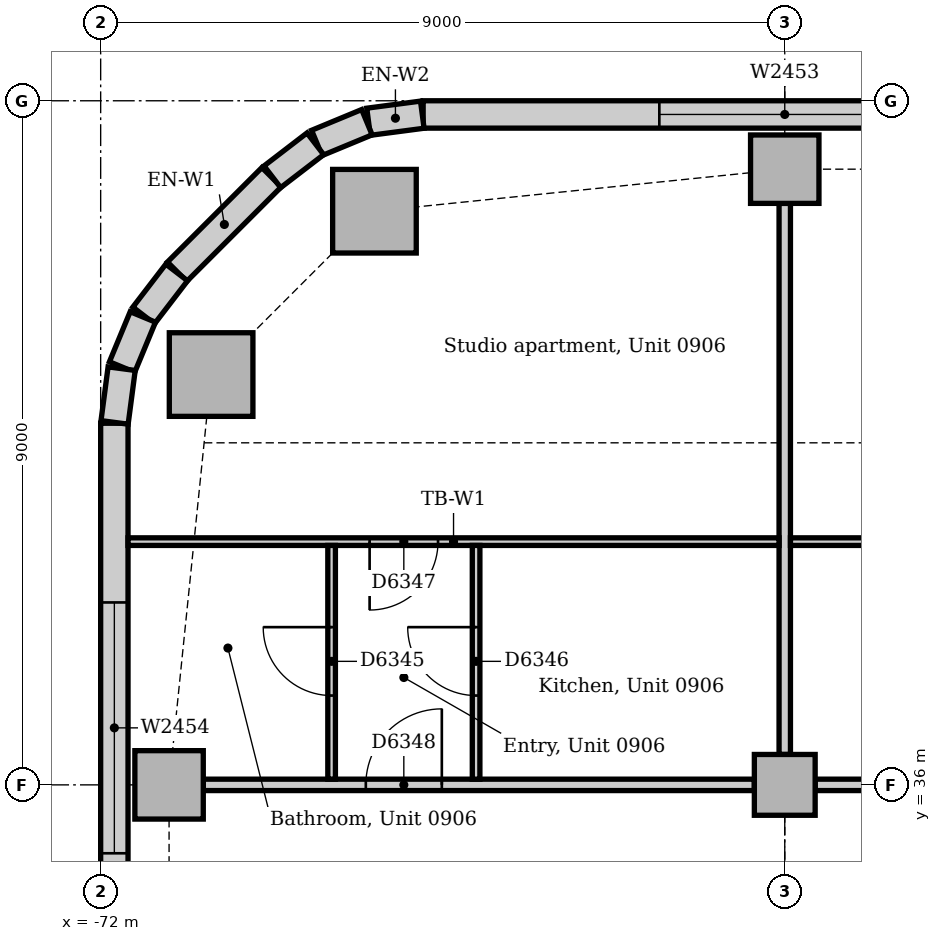
"""IFC4 building model, lengths in metres.
Left out: names, types, materials, properties, quantities, classifications, styles, units other than length and angle.
Written with IfcOpenShell. Run it as: python <this file> out.ifc"""

import sys

from ifc_helpers import new_model, si_unit, direction, frame, frame_2d, origin, origin_2d, place, context, subcontext, project, spatial, rectangle, extrude, element, fill, save


model = new_model("IFC4")
c1 = context("Model", 3, precision=1e-05, world=origin(), true_north=direction((0.0, 1.0)))
c2 = subcontext(c1, "Body", "Model", "MODEL_VIEW")
j1 = project(units=[si_unit("LENGTHUNIT", "METRE"), si_unit("PLANEANGLEUNIT", "RADIAN")], contexts=[c1])
p1 = place(None, origin())
s1 = spatial("IfcSite", under=j1, at=p1, CompositionType="ELEMENT")
p2 = place(p1, origin())
s2 = spatial("IfcBuilding", under=s1, at=p2, CompositionType="ELEMENT")
p3 = place(p2, frame((0.0, 0.0, 42.0)))
s3 = spatial("IfcBuildingStorey", under=s2, at=p3, CompositionType="ELEMENT", Elevation=42.0)
for number, where, z_axis, x_axis in (
    (1, (-68.398, 43.547, 0.0), (0.0, 0.0, 1.0), (1.0, 0.0, 0.0)),
    (2, (-70.547, 41.398, 0.0), (0.0, 0.0, 1.0), (1.0, 0.0, 0.0)),
):
    element("IfcColumn", number, at=place(p3, frame(where, z_axis=z_axis, x_axis=x_axis)), inside=s3, PredefinedType="COLUMN", context=c2, shape_type="SweptSolid", body=[
        extrude(rectangle(XDim=1.1, YDim=1.1, at=origin_2d()), origin(), (0.0, 0.0, 1.0), 3.7),
    ])
for number, where, z_axis, x_axis in (
    (3, (-63.0, 44.1, 0.0), (0.0, 0.0, 1.0), (1.0, 0.0, 0.0)),
    (4, (-71.1, 36.0, 0.0), (0.0, 0.0, 1.0), (1.0, 0.0, 0.0)),
):
    element("IfcColumn", number, at=place(p3, frame(where, z_axis=z_axis, x_axis=x_axis)), inside=s3, PredefinedType="COLUMN", context=c2, shape_type="SweptSolid", body=[
        extrude(rectangle(XDim=0.9, YDim=0.9, at=origin_2d()), origin(), (0.0, 0.0, 1.0), 3.7),
    ])
p4 = place(p3, frame((-63.0, 36.0, 0.0), z_axis=(0.0, 0.0, 1.0), x_axis=(1.0, 0.0, 0.0)))
e5 = element("IfcColumn", 5, at=p4, inside=s3, PredefinedType="COLUMN", context=c2, shape_type="SweptSolid", body=[
    extrude(rectangle(XDim=0.8, YDim=0.8, at=origin_2d()), origin(), (0.0, 0.0, 1.0), 3.7),
])
p5 = place(p3, frame((-31.243, 44.82, 0.0), z_axis=(0.0, 0.0, 1.0), x_axis=(-1.0, 0.0, 0.0)))
e6 = element("IfcWall", 6, at=p5, inside=s3, PredefinedType="STANDARD", context=c2, shape_type="SweptSolid", body=[
    extrude(rectangle(XDim=36.515, YDim=0.36, at=frame_2d((18.257, 0.0))), origin(), (0.0, 0.0, 1.0), 3.7),
])
p6 = place(p5, frame((3.107, 0.0, 0.9)))
e7 = element("IfcOpeningElement", 7, at=p6, cuts=e6, PredefinedType="OPENING", context=c2, shape_type="SweptSolid", body=[
    extrude(rectangle(XDim=3.3, YDim=1.6, at=frame_2d((1.65, 0.8))), frame((0.0, 0.19, 0.0), z_axis=(0.0, -1.0, 0.0), x_axis=(1.0, 0.0, 0.0)), (0.0, 0.0, 1.0), 0.38),
])
p7 = place(p5, frame((7.607, 0.0, 0.9)))
e8 = element("IfcOpeningElement", 8, at=p7, cuts=e6, PredefinedType="OPENING", context=c2, shape_type="SweptSolid", body=[
    extrude(rectangle(XDim=3.3, YDim=1.6, at=frame_2d((1.65, 0.8))), frame((0.0, 0.19, 0.0), z_axis=(0.0, -1.0, 0.0), x_axis=(1.0, 0.0, 0.0)), (0.0, 0.0, 1.0), 0.38),
])
p8 = place(p5, frame((12.107, 0.0, 0.9)))
e9 = element("IfcOpeningElement", 9, at=p8, cuts=e6, PredefinedType="OPENING", context=c2, shape_type="SweptSolid", body=[
    extrude(rectangle(XDim=3.3, YDim=1.6, at=frame_2d((1.65, 0.8))), frame((0.0, 0.19, 0.0), z_axis=(0.0, -1.0, 0.0), x_axis=(1.0, 0.0, 0.0)), (0.0, 0.0, 1.0), 0.38),
])
p9 = place(p5, frame((16.607, 0.0, 0.9)))
e10 = element("IfcOpeningElement", 10, at=p9, cuts=e6, PredefinedType="OPENING", context=c2, shape_type="SweptSolid", body=[
    extrude(rectangle(XDim=3.3, YDim=1.6, at=frame_2d((1.65, 0.8))), frame((0.0, 0.19, 0.0), z_axis=(0.0, -1.0, 0.0), x_axis=(1.0, 0.0, 0.0)), (0.0, 0.0, 1.0), 0.38),
])
p10 = place(p5, frame((21.107, 0.0, 0.9)))
e11 = element("IfcOpeningElement", 11, at=p10, cuts=e6, PredefinedType="OPENING", context=c2, shape_type="SweptSolid", body=[
    extrude(rectangle(XDim=3.3, YDim=1.6, at=frame_2d((1.65, 0.8))), frame((0.0, 0.19, 0.0), z_axis=(0.0, -1.0, 0.0), x_axis=(1.0, 0.0, 0.0)), (0.0, 0.0, 1.0), 0.38),
])
p11 = place(p5, frame((25.607, 0.0, 0.9)))
e12 = element("IfcOpeningElement", 12, at=p11, cuts=e6, PredefinedType="OPENING", context=c2, shape_type="SweptSolid", body=[
    extrude(rectangle(XDim=3.3, YDim=1.6, at=frame_2d((1.65, 0.8))), frame((0.0, 0.19, 0.0), z_axis=(0.0, -1.0, 0.0), x_axis=(1.0, 0.0, 0.0)), (0.0, 0.0, 1.0), 0.38),
])
p12 = place(p5, frame((30.107, 0.0, 0.9)))
e13 = element("IfcOpeningElement", 13, at=p12, cuts=e6, PredefinedType="OPENING", context=c2, shape_type="SweptSolid", body=[
    extrude(rectangle(XDim=3.3, YDim=1.6, at=frame_2d((1.65, 0.8))), frame((0.0, 0.19, 0.0), z_axis=(0.0, -1.0, 0.0), x_axis=(1.0, 0.0, 0.0)), (0.0, 0.0, 1.0), 0.38),
])
p13 = place(p3, frame((-69.751, 43.994, 0.0), z_axis=(0.0, 0.0, 1.0), x_axis=(-0.707106781187, -0.707106781187, 0.0)))
e14 = element("IfcWall", 14, at=p13, inside=s3, PredefinedType="STANDARD", context=c2, shape_type="SweptSolid", body=[
    extrude(rectangle(XDim=1.757, YDim=0.36, at=frame_2d((0.879, 0.0))), origin(), (0.0, 0.0, 1.0), 3.7),
])
p14 = place(p3, frame((-71.82, 40.757, 0.0), z_axis=(0.0, 0.0, 1.0), x_axis=(0.0, -1.0, 0.0)))
e15 = element("IfcWall", 15, at=p14, inside=s3, PredefinedType="STANDARD", context=c2, shape_type="SweptSolid", body=[
    extrude(rectangle(XDim=26.015, YDim=0.36, at=frame_2d((13.007, 0.0))), origin(), (0.0, 0.0, 1.0), 3.7),
])
p15 = place(p14, frame((2.357, 0.0, 0.9)))
e16 = element("IfcOpeningElement", 16, at=p15, cuts=e15, PredefinedType="OPENING", context=c2, shape_type="SweptSolid", body=[
    extrude(rectangle(XDim=3.3, YDim=1.6, at=frame_2d((1.65, 0.8))), frame((0.0, 0.19, 0.0), z_axis=(0.0, -1.0, 0.0), x_axis=(1.0, 0.0, 0.0)), (0.0, 0.0, 1.0), 0.38),
])
p16 = place(p14, frame((7.057, 0.0, 0.9)))
e17 = element("IfcOpeningElement", 17, at=p16, cuts=e15, PredefinedType="OPENING", context=c2, shape_type="SweptSolid", body=[
    extrude(rectangle(XDim=3.3, YDim=1.6, at=frame_2d((1.65, 0.8))), frame((0.0, 0.19, 0.0), z_axis=(0.0, -1.0, 0.0), x_axis=(1.0, 0.0, 0.0)), (0.0, 0.0, 1.0), 0.38),
])
p17 = place(p14, frame((11.357, 0.0, 0.9)))
e18 = element("IfcOpeningElement", 18, at=p17, cuts=e15, PredefinedType="OPENING", context=c2, shape_type="SweptSolid", body=[
    extrude(rectangle(XDim=3.3, YDim=1.6, at=frame_2d((1.65, 0.8))), frame((0.0, 0.19, 0.0), z_axis=(0.0, -1.0, 0.0), x_axis=(1.0, 0.0, 0.0)), (0.0, 0.0, 1.0), 0.38),
])
p18 = place(p14, frame((15.857, 0.0, 0.9)))
e19 = element("IfcOpeningElement", 19, at=p18, cuts=e15, PredefinedType="OPENING", context=c2, shape_type="SweptSolid", body=[
    extrude(rectangle(XDim=3.3, YDim=1.6, at=frame_2d((1.65, 0.8))), frame((0.0, 0.19, 0.0), z_axis=(0.0, -1.0, 0.0), x_axis=(1.0, 0.0, 0.0)), (0.0, 0.0, 1.0), 0.38),
])
p19 = place(p14, frame((20.957, 0.0, 0.9)))
e20 = element("IfcOpeningElement", 20, at=p19, cuts=e15, PredefinedType="OPENING", context=c2, shape_type="SweptSolid", body=[
    extrude(rectangle(XDim=3.3, YDim=1.6, at=frame_2d((1.65, 0.8))), frame((0.0, 0.19, 0.0), z_axis=(0.0, -1.0, 0.0), x_axis=(1.0, 0.0, 0.0)), (0.0, 0.0, 1.0), 0.38),
])
for number, where, z_axis, x_axis in (
    (21, (-67.769, 44.817, 0.0), (0.0, 0.0, 1.0), (-0.991, -0.131, 0.0)),
    (22, (-68.497, 44.718, 0.0), (0.0, 0.0, 1.0), (-0.924, -0.383, 0.0)),
):
    element("IfcWall", number, at=place(p3, frame(where, z_axis=z_axis, x_axis=x_axis)), inside=s3, PredefinedType="STANDARD", context=c2, shape_type="SweptSolid", body=[
        extrude(rectangle(XDim=0.713, YDim=0.36, at=frame_2d((0.356, 0.0))), origin(), (0.0, 0.0, 1.0), 3.7),
    ])
for number, where, z_axis, x_axis in (
    (23, (-69.175, 44.434, 0.0), (0.0, 0.0, 1.0), (-0.793, -0.609, 0.0)),
    (24, (-71.0, 42.741, 0.0), (0.0, 0.0, 1.0), (-0.609, -0.793, 0.0)),
):
    element("IfcWall", number, at=place(p3, frame(where, z_axis=z_axis, x_axis=x_axis)), inside=s3, PredefinedType="STANDARD", context=c2, shape_type="SweptSolid", body=[
        extrude(rectangle(XDim=0.713, YDim=0.36, at=frame_2d((0.357, 0.0))), origin(), (0.0, 0.0, 1.0), 3.7),
    ])
for number, where, z_axis, x_axis in (
    (25, (-71.445, 42.156, 0.0), (0.0, 0.0, 1.0), (-0.383, -0.924, 0.0)),
    (26, (-71.724, 41.476, 0.0), (0.0, 0.0, 1.0), (-0.131, -0.991, 0.0)),
):
    element("IfcWall", number, at=place(p3, frame(where, z_axis=z_axis, x_axis=x_axis)), inside=s3, PredefinedType="STANDARD", context=c2, shape_type="SweptSolid", body=[
        extrude(rectangle(XDim=0.713, YDim=0.36, at=frame_2d((0.356, 0.0))), origin(), (0.0, 0.0, 1.0), 3.7),
    ])
p20 = place(p3, frame((-62.6, 36.0, 0.0), z_axis=(0.0, 0.0, 1.0), x_axis=(1.0, 0.0, 0.0)))
e27 = element("IfcWall", 27, at=p20, inside=s3, PredefinedType="PARTITIONING", context=c2, shape_type="SweptSolid", body=[
    extrude(rectangle(XDim=8.2, YDim=0.15, at=frame_2d((4.1, 0.0))), origin(), (0.0, 0.0, 1.0), 3.0),
])
p21 = place(p20, frame((2.89, 0.0, 0.0)))
e28 = element("IfcOpeningElement", 28, at=p21, cuts=e27, PredefinedType="OPENING", context=c2, shape_type="SweptSolid", body=[
    extrude(rectangle(XDim=1.0, YDim=2.1, at=frame_2d((0.5, 1.05))), frame((0.0, 0.085, 0.0), z_axis=(0.0, -1.0, 0.0), x_axis=(1.0, 0.0, 0.0)), (0.0, 0.0, 1.0), 0.17),
])
p22 = place(p3, frame((-70.65, 36.0, 0.0), z_axis=(0.0, 0.0, 1.0), x_axis=(1.0, 0.0, 0.0)))
e29 = element("IfcWall", 29, at=p22, inside=s3, PredefinedType="PARTITIONING", context=c2, shape_type="SweptSolid", body=[
    extrude(rectangle(XDim=7.25, YDim=0.15, at=frame_2d((3.625, 0.0))), origin(), (0.0, 0.0, 1.0), 3.0),
])
p23 = place(p22, frame((2.138, 0.0, 0.0)))
e30 = element("IfcOpeningElement", 30, at=p23, cuts=e29, PredefinedType="OPENING", context=c2, shape_type="SweptSolid", body=[
    extrude(rectangle(XDim=1.0, YDim=2.1, at=frame_2d((0.5, 1.05))), frame((0.0, 0.085, 0.0), z_axis=(0.0, -1.0, 0.0), x_axis=(1.0, 0.0, 0.0)), (0.0, 0.0, 1.0), 0.17),
])
p24 = place(p3, frame((-63.0, 36.4, 0.0), z_axis=(0.0, 0.0, 1.0), x_axis=(0.0, 1.0, 0.0)))
e31 = element("IfcWall", 31, at=p24, inside=s3, PredefinedType="PARTITIONING", context=c2, shape_type="SweptSolid", body=[
    extrude(rectangle(XDim=7.25, YDim=0.15, at=frame_2d((3.625, 0.0))), origin(), (0.0, 0.0, 1.0), 3.008),
])
p25 = place(p3, frame((-62.925, 39.2, 0.0), z_axis=(0.0, 0.0, 1.0), x_axis=(1.0, 0.0, 0.0)))
e32 = element("IfcWall", 32, at=p25, inside=s3, PredefinedType="PARTITIONING", context=c2, shape_type="SweptSolid", body=[
    extrude(rectangle(XDim=8.85, YDim=0.1, at=frame_2d((4.425, 0.0))), origin(), (0.0, 0.0, 1.0), 3.7),
])
p26 = place(p25, frame((3.265, 0.0, 0.0)))
e33 = element("IfcOpeningElement", 33, at=p26, cuts=e32, PredefinedType="OPENING", context=c2, shape_type="SweptSolid", body=[
    extrude(rectangle(XDim=0.9, YDim=2.1, at=frame_2d((0.45, 1.05))), frame((0.0, 0.06, 0.0), z_axis=(0.0, -1.0, 0.0), x_axis=(1.0, 0.0, 0.0)), (0.0, 0.0, 1.0), 0.12),
])
p27 = place(p3, frame((-71.64, 39.2, 0.0), z_axis=(0.0, 0.0, 1.0), x_axis=(1.0, 0.0, 0.0)))
e34 = element("IfcWall", 34, at=p27, inside=s3, PredefinedType="PARTITIONING", context=c2, shape_type="SweptSolid", body=[
    extrude(rectangle(XDim=8.565, YDim=0.1, at=frame_2d((4.282, 0.0))), origin(), (0.0, 0.0, 1.0), 3.7),
])
p28 = place(p27, frame((3.178, 0.0, 0.0)))
e35 = element("IfcOpeningElement", 35, at=p28, cuts=e34, PredefinedType="OPENING", context=c2, shape_type="SweptSolid", body=[
    extrude(rectangle(XDim=0.9, YDim=2.1, at=frame_2d((0.45, 1.05))), frame((0.0, 0.06, 0.0), z_axis=(0.0, -1.0, 0.0), x_axis=(1.0, 0.0, 0.0)), (0.0, 0.0, 1.0), 0.12),
])
p29 = place(p3, frame((-68.962, 36.075, 0.0), z_axis=(0.0, 0.0, 1.0), x_axis=(0.0, 1.0, 0.0)))
e36 = element("IfcWall", 36, at=p29, inside=s3, PredefinedType="PARTITIONING", context=c2, shape_type="SweptSolid", body=[
    extrude(rectangle(XDim=3.075, YDim=0.1, at=frame_2d((1.538, 0.0))), origin(), (0.0, 0.0, 1.0), 3.7),
])
p30 = place(p29, frame((1.1, 0.0, 0.0)))
e37 = element("IfcOpeningElement", 37, at=p30, cuts=e36, PredefinedType="OPENING", context=c2, shape_type="SweptSolid", body=[
    extrude(rectangle(XDim=0.9, YDim=2.1, at=frame_2d((0.45, 1.05))), frame((0.0, 0.06, 0.0), z_axis=(0.0, -1.0, 0.0), x_axis=(1.0, 0.0, 0.0)), (0.0, 0.0, 1.0), 0.12),
])
p31 = place(p3, frame((-67.061, 36.075, 0.0), z_axis=(0.0, 0.0, 1.0), x_axis=(0.0, 1.0, 0.0)))
e38 = element("IfcWall", 38, at=p31, inside=s3, PredefinedType="PARTITIONING", context=c2, shape_type="SweptSolid", body=[
    extrude(rectangle(XDim=3.075, YDim=0.1, at=frame_2d((1.538, 0.0))), origin(), (0.0, 0.0, 1.0), 3.7),
])
p32 = place(p31, frame((1.1, 0.0, 0.0)))
e39 = element("IfcOpeningElement", 39, at=p32, cuts=e38, PredefinedType="OPENING", context=c2, shape_type="SweptSolid", body=[
    extrude(rectangle(XDim=0.9, YDim=2.1, at=frame_2d((0.45, 1.05))), frame((0.0, 0.06, 0.0), z_axis=(0.0, -1.0, 0.0), x_axis=(1.0, 0.0, 0.0)), (0.0, 0.0, 1.0), 0.12),
])
p33 = place(p12, origin())
e40 = element("IfcWindow", 40, at=p33, inside=s3, PartitioningType="SINGLE_PANEL", PredefinedType="WINDOW", context=c2, shape_type="SweptSolid", body=[
    extrude(rectangle(XDim=3.3, YDim=1.6, at=frame_2d((1.65, 0.8))), frame((0.0, 0.13, 0.0), z_axis=(0.0, -1.0, 0.0), x_axis=(1.0, 0.0, 0.0)), (0.0, 0.0, 1.0), 0.06),
])
fill(e13, e40)
p34 = place(p15, origin())
e41 = element("IfcWindow", 41, at=p34, inside=s3, PartitioningType="SINGLE_PANEL", PredefinedType="WINDOW", context=c2, shape_type="SweptSolid", body=[
    extrude(rectangle(XDim=3.3, YDim=1.6, at=frame_2d((1.65, 0.8))), frame((0.0, 0.13, 0.0), z_axis=(0.0, -1.0, 0.0), x_axis=(1.0, 0.0, 0.0)), (0.0, 0.0, 1.0), 0.06),
])
fill(e16, e41)
p35 = place(p30, origin())
e42 = element("IfcDoor", 42, at=p35, inside=s3, OperationType="SINGLE_SWING_RIGHT", PredefinedType="DOOR", context=c2, shape_type="SweptSolid", body=[
    extrude(rectangle(XDim=0.9, YDim=2.1, at=frame_2d((0.45, 1.05))), frame((0.0, 0.025, 0.0), z_axis=(0.0, -1.0, 0.0), x_axis=(1.0, 0.0, 0.0)), (0.0, 0.0, 1.0), 0.05),
])
fill(e37, e42)
p36 = place(p32, origin())
e43 = element("IfcDoor", 43, at=p36, inside=s3, OperationType="SINGLE_SWING_RIGHT", PredefinedType="DOOR", context=c2, shape_type="SweptSolid", body=[
    extrude(rectangle(XDim=0.9, YDim=2.1, at=frame_2d((0.45, 1.05))), frame((0.0, 0.025, 0.0), z_axis=(0.0, -1.0, 0.0), x_axis=(1.0, 0.0, 0.0)), (0.0, 0.0, 1.0), 0.05),
])
fill(e39, e43)
p37 = place(p28, frame((0.9, 0.0, 0.0), z_axis=(0.0, 0.0, 1.0), x_axis=(-1.0, 0.0, 0.0)))
e44 = element("IfcDoor", 44, at=p37, inside=s3, OperationType="SINGLE_SWING_RIGHT", PredefinedType="DOOR", context=c2, shape_type="SweptSolid", body=[
    extrude(rectangle(XDim=0.9, YDim=2.1, at=frame_2d((0.45, 1.05))), frame((0.0, 0.025, 0.0), z_axis=(0.0, -1.0, 0.0), x_axis=(1.0, 0.0, 0.0)), (0.0, 0.0, 1.0), 0.05),
])
fill(e35, e44)
p38 = place(p23, origin())
e45 = element("IfcDoor", 45, at=p38, inside=s3, OperationType="SINGLE_SWING_RIGHT", PredefinedType="DOOR", context=c2, shape_type="SweptSolid", body=[
    extrude(rectangle(XDim=1.0, YDim=2.1, at=frame_2d((0.5, 1.05))), frame((0.0, 0.025, 0.0), z_axis=(0.0, -1.0, 0.0), x_axis=(1.0, 0.0, 0.0)), (0.0, 0.0, 1.0), 0.05),
])
fill(e30, e45)
save(model, sys.argv[1])
